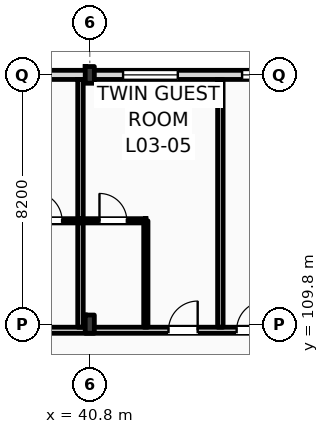
"""IFC4 building model, lengths in metres.
Left out: names, types, materials, properties, quantities, classifications, styles, units other than length and angle.
Written with IfcOpenShell. Run it as: python <this file> out.ifc"""

import sys

from ifc_helpers import new_model, si_unit, direction, frame, frame_2d, origin, origin_2d, place, context, subcontext, project, spatial, rectangle, i_section, extrude, element, fill, save


model = new_model("IFC4")
c1 = context("Model", 3, precision=1e-05, world=origin(), true_north=direction((0.0, 1.0)))
c2 = subcontext(c1, "Body", "Model", "MODEL_VIEW")
j1 = project(units=[si_unit("LENGTHUNIT", "METRE"), si_unit("PLANEANGLEUNIT", "RADIAN")], contexts=[c1])
p1 = place(None, origin())
s1 = spatial("IfcSite", under=j1, at=p1, CompositionType="ELEMENT")
p2 = place(p1, origin())
s2 = spatial("IfcBuilding", under=s1, at=p2, CompositionType="ELEMENT")
p3 = place(p2, frame((0.0, 0.0, 16.2)))
s3 = spatial("IfcBuildingStorey", under=s2, at=p3, CompositionType="ELEMENT", Elevation=16.2)
p4 = place(p3, frame((40.8, 109.8, 0.0), z_axis=(0.0, 0.0, 1.0), x_axis=(1.0, 0.0, 0.0)))
e1 = element("IfcColumn", 1, at=p4, inside=s3, PredefinedType="COLUMN", context=c2, shape_type="SweptSolid", body=[
    extrude(i_section(OverallWidth=0.3, OverallDepth=0.6, WebThickness=0.015, FlangeThickness=0.03, FilletRadius=0.027, at=origin_2d()), origin(), (0.0, 0.0, 1.0), 4.2),
])
p5 = place(p3, frame((40.8, 118.0, 0.0), z_axis=(0.0, 0.0, 1.0), x_axis=(1.0, 0.0, 0.0)))
e2 = element("IfcColumn", 2, at=p5, inside=s3, PredefinedType="COLUMN", context=c2, shape_type="SweptSolid", body=[
    extrude(i_section(OverallWidth=0.3, OverallDepth=0.55, WebThickness=0.015, FlangeThickness=0.029, FilletRadius=0.027, at=origin_2d()), origin(), (0.0, 0.0, 1.0), 4.2),
])
p6 = place(p3, frame((22.5, 118.0, 0.0), z_axis=(0.0, 0.0, 1.0), x_axis=(1.0, 0.0, 0.0)))
e3 = element("IfcWall", 3, at=p6, inside=s3, PredefinedType="STANDARD", context=c2, shape_type="SweptSolid", body=[
    extrude(rectangle(XDim=97.5, YDim=0.3, at=frame_2d((48.75, 0.0))), origin(), (0.0, 0.0, 1.0), 3.36),
])
p7 = place(p6, frame((3.721, 0.0, 0.9)))
e4 = element("IfcOpeningElement", 4, at=p7, cuts=e3, PredefinedType="OPENING", context=c2, shape_type="SweptSolid", body=[
    extrude(rectangle(XDim=0.9, YDim=1.8, at=frame_2d((0.45, 0.9))), frame((0.0, 0.16, 0.0), z_axis=(0.0, -1.0, 0.0), x_axis=(1.0, 0.0, 0.0)), (0.0, 0.0, 1.0), 0.32),
])
p8 = place(p6, frame((6.447, 0.0, 0.9)))
e5 = element("IfcOpeningElement", 5, at=p8, cuts=e3, PredefinedType="OPENING", context=c2, shape_type="SweptSolid", body=[
    extrude(rectangle(XDim=1.35, YDim=1.85, at=frame_2d((0.675, 0.925))), frame((0.0, 0.16, 0.0), z_axis=(0.0, -1.0, 0.0), x_axis=(1.0, 0.0, 0.0)), (0.0, 0.0, 1.0), 0.32),
])
p9 = place(p6, frame((11.363, 0.0, 0.9)))
e6 = element("IfcOpeningElement", 6, at=p9, cuts=e3, PredefinedType="OPENING", context=c2, shape_type="SweptSolid", body=[
    extrude(rectangle(XDim=1.5, YDim=1.9, at=frame_2d((0.75, 0.95))), frame((0.0, 0.16, 0.0), z_axis=(0.0, -1.0, 0.0), x_axis=(1.0, 0.0, 0.0)), (0.0, 0.0, 1.0), 0.32),
])
p10 = place(p6, frame((15.078, 0.0, 0.9)))
e7 = element("IfcOpeningElement", 7, at=p10, cuts=e3, PredefinedType="OPENING", context=c2, shape_type="SweptSolid", body=[
    extrude(rectangle(XDim=1.65, YDim=1.95, at=frame_2d((0.825, 0.975))), frame((0.0, 0.16, 0.0), z_axis=(0.0, -1.0, 0.0), x_axis=(1.0, 0.0, 0.0)), (0.0, 0.0, 1.0), 0.32),
])
p11 = place(p6, frame((19.395, 0.0, 0.9)))
e8 = element("IfcOpeningElement", 8, at=p11, cuts=e3, PredefinedType="OPENING", context=c2, shape_type="SweptSolid", body=[
    extrude(rectangle(XDim=1.8, YDim=2.0, at=frame_2d((0.9, 1.0))), frame((0.0, 0.16, 0.0), z_axis=(0.0, -1.0, 0.0), x_axis=(1.0, 0.0, 0.0)), (0.0, 0.0, 1.0), 0.32),
])
p12 = place(p6, frame((23.31, 0.0, 0.9)))
e9 = element("IfcOpeningElement", 9, at=p12, cuts=e3, PredefinedType="OPENING", context=c2, shape_type="SweptSolid", body=[
    extrude(rectangle(XDim=1.95, YDim=2.05, at=frame_2d((0.975, 1.025))), frame((0.0, 0.16, 0.0), z_axis=(0.0, -1.0, 0.0), x_axis=(1.0, 0.0, 0.0)), (0.0, 0.0, 1.0), 0.32),
])
p13 = place(p6, frame((28.026, 0.0, 0.9)))
e10 = element("IfcOpeningElement", 10, at=p13, cuts=e3, PredefinedType="OPENING", context=c2, shape_type="SweptSolid", body=[
    extrude(rectangle(XDim=2.1, YDim=2.1, at=frame_2d((1.05, 1.05))), frame((0.0, 0.16, 0.0), z_axis=(0.0, -1.0, 0.0), x_axis=(1.0, 0.0, 0.0)), (0.0, 0.0, 1.0), 0.32),
])
p14 = place(p6, frame((31.941, 0.0, 0.9)))
e11 = element("IfcOpeningElement", 11, at=p14, cuts=e3, PredefinedType="OPENING", context=c2, shape_type="SweptSolid", body=[
    extrude(rectangle(XDim=1.1, YDim=2.15, at=frame_2d((0.55, 1.075))), frame((0.0, 0.16, 0.0), z_axis=(0.0, -1.0, 0.0), x_axis=(1.0, 0.0, 0.0)), (0.0, 0.0, 1.0), 0.32),
])
p15 = place(p6, frame((36.657, 0.0, 0.9)))
e12 = element("IfcOpeningElement", 12, at=p15, cuts=e3, PredefinedType="OPENING", context=c2, shape_type="SweptSolid", body=[
    extrude(rectangle(XDim=2.4, YDim=2.2, at=frame_2d((1.2, 1.1))), frame((0.0, 0.16, 0.0), z_axis=(0.0, -1.0, 0.0), x_axis=(1.0, 0.0, 0.0)), (0.0, 0.0, 1.0), 0.32),
])
p16 = place(p6, frame((42.574, 0.0, 0.9)))
e13 = element("IfcOpeningElement", 13, at=p16, cuts=e3, PredefinedType="OPENING", context=c2, shape_type="SweptSolid", body=[
    extrude(rectangle(XDim=1.35, YDim=2.25, at=frame_2d((0.675, 1.125))), frame((0.0, 0.16, 0.0), z_axis=(0.0, -1.0, 0.0), x_axis=(1.0, 0.0, 0.0)), (0.0, 0.0, 1.0), 0.32),
])
p17 = place(p6, frame((45.289, 0.0, 0.9)))
e14 = element("IfcOpeningElement", 14, at=p17, cuts=e3, PredefinedType="OPENING", context=c2, shape_type="SweptSolid", body=[
    extrude(rectangle(XDim=2.7, YDim=2.28, at=frame_2d((1.35, 1.14))), frame((0.0, 0.16, 0.0), z_axis=(0.0, -1.0, 0.0), x_axis=(1.0, 0.0, 0.0)), (0.0, 0.0, 1.0), 0.32),
])
p18 = place(p6, frame((50.406, 0.0, 0.9)))
e15 = element("IfcOpeningElement", 15, at=p18, cuts=e3, PredefinedType="OPENING", context=c2, shape_type="SweptSolid", body=[
    extrude(rectangle(XDim=1.8, YDim=2.28, at=frame_2d((0.9, 1.14))), frame((0.0, 0.16, 0.0), z_axis=(0.0, -1.0, 0.0), x_axis=(1.0, 0.0, 0.0)), (0.0, 0.0, 1.0), 0.32),
])
p19 = place(p6, frame((53.922, 0.0, 0.9)))
e16 = element("IfcOpeningElement", 16, at=p19, cuts=e3, PredefinedType="OPENING", context=c2, shape_type="SweptSolid", body=[
    extrude(rectangle(XDim=1.8, YDim=2.28, at=frame_2d((0.9, 1.14))), frame((0.0, 0.16, 0.0), z_axis=(0.0, -1.0, 0.0), x_axis=(1.0, 0.0, 0.0)), (0.0, 0.0, 1.0), 0.32),
])
p20 = place(p6, frame((58.332, 0.0, 0.9)))
e17 = element("IfcOpeningElement", 17, at=p20, cuts=e3, PredefinedType="OPENING", context=c2, shape_type="SweptSolid", body=[
    extrude(rectangle(XDim=2.961, YDim=2.28, at=frame_2d((1.48, 1.14))), frame((0.0, 0.16, 0.0), z_axis=(0.0, -1.0, 0.0), x_axis=(1.0, 0.0, 0.0)), (0.0, 0.0, 1.0), 0.32),
])
p21 = place(p6, frame((62.513, 0.0, 0.9)))
e18 = element("IfcOpeningElement", 18, at=p21, cuts=e3, PredefinedType="OPENING", context=c2, shape_type="SweptSolid", body=[
    extrude(rectangle(XDim=1.8, YDim=2.28, at=frame_2d((0.9, 1.14))), frame((0.0, 0.16, 0.0), z_axis=(0.0, -1.0, 0.0), x_axis=(1.0, 0.0, 0.0)), (0.0, 0.0, 1.0), 0.32),
])
p22 = place(p6, frame((67.114, 0.0, 0.9)))
e19 = element("IfcOpeningElement", 19, at=p22, cuts=e3, PredefinedType="OPENING", context=c2, shape_type="SweptSolid", body=[
    extrude(rectangle(XDim=2.961, YDim=2.28, at=frame_2d((1.48, 1.14))), frame((0.0, 0.16, 0.0), z_axis=(0.0, -1.0, 0.0), x_axis=(1.0, 0.0, 0.0)), (0.0, 0.0, 1.0), 0.32),
])
p23 = place(p6, frame((73.695, 0.0, 0.9)))
e20 = element("IfcOpeningElement", 20, at=p23, cuts=e3, PredefinedType="OPENING", context=c2, shape_type="SweptSolid", body=[
    extrude(rectangle(XDim=1.1, YDim=2.28, at=frame_2d((0.55, 1.14))), frame((0.0, 0.16, 0.0), z_axis=(0.0, -1.0, 0.0), x_axis=(1.0, 0.0, 0.0)), (0.0, 0.0, 1.0), 0.32),
])
p24 = place(p6, frame((75.895, 0.0, 0.9)))
e21 = element("IfcOpeningElement", 21, at=p24, cuts=e3, PredefinedType="OPENING", context=c2, shape_type="SweptSolid", body=[
    extrude(rectangle(XDim=2.961, YDim=2.28, at=frame_2d((1.48, 1.14))), frame((0.0, 0.16, 0.0), z_axis=(0.0, -1.0, 0.0), x_axis=(1.0, 0.0, 0.0)), (0.0, 0.0, 1.0), 0.32),
])
p25 = place(p6, frame((81.676, 0.0, 0.9)))
e22 = element("IfcOpeningElement", 22, at=p25, cuts=e3, PredefinedType="OPENING", context=c2, shape_type="SweptSolid", body=[
    extrude(rectangle(XDim=1.8, YDim=2.28, at=frame_2d((0.9, 1.14))), frame((0.0, 0.16, 0.0), z_axis=(0.0, -1.0, 0.0), x_axis=(1.0, 0.0, 0.0)), (0.0, 0.0, 1.0), 0.32),
])
p26 = place(p6, frame((84.677, 0.0, 0.9)))
e23 = element("IfcOpeningElement", 23, at=p26, cuts=e3, PredefinedType="OPENING", context=c2, shape_type="SweptSolid", body=[
    extrude(rectangle(XDim=2.961, YDim=2.28, at=frame_2d((1.48, 1.14))), frame((0.0, 0.16, 0.0), z_axis=(0.0, -1.0, 0.0), x_axis=(1.0, 0.0, 0.0)), (0.0, 0.0, 1.0), 0.32),
])
p27 = place(p6, frame((89.999, 0.0, 0.9)))
e24 = element("IfcOpeningElement", 24, at=p27, cuts=e3, PredefinedType="OPENING", context=c2, shape_type="SweptSolid", body=[
    extrude(rectangle(XDim=1.1, YDim=1.5, at=frame_2d((0.55, 0.75))), frame((0.0, 0.16, 0.0), z_axis=(0.0, -1.0, 0.0), x_axis=(1.0, 0.0, 0.0)), (0.0, 0.0, 1.0), 0.32),
])
p28 = place(p6, frame((94.35, 0.0, 0.9)))
e25 = element("IfcOpeningElement", 25, at=p28, cuts=e3, PredefinedType="OPENING", context=c2, shape_type="SweptSolid", body=[
    extrude(rectangle(XDim=1.25, YDim=1.6, at=frame_2d((0.625, 0.8))), frame((0.0, 0.16, 0.0), z_axis=(0.0, -1.0, 0.0), x_axis=(1.0, 0.0, 0.0)), (0.0, 0.0, 1.0), 0.32),
])
p29 = place(p3, frame((10.65, 109.6, 0.0), z_axis=(0.0, 0.0, 1.0), x_axis=(1.0, 0.0, 0.0)))
e26 = element("IfcWall", 26, at=p29, inside=s3, PredefinedType="PARTITIONING", context=c2, shape_type="SweptSolid", body=[
    extrude(rectangle(XDim=109.21, YDim=0.2, at=frame_2d((54.605, 0.0))), origin(), (0.0, 0.0, 1.0), 3.36),
])
p30 = place(p29, frame((15.43, 0.0, 0.0)))
e27 = element("IfcOpeningElement", 27, at=p30, cuts=e26, PredefinedType="OPENING", context=c2, shape_type="SweptSolid", body=[
    extrude(rectangle(XDim=1.02, YDim=2.2, at=frame_2d((0.51, 1.1))), frame((0.0, 0.11, 0.0), z_axis=(0.0, -1.0, 0.0), x_axis=(1.0, 0.0, 0.0)), (0.0, 0.0, 1.0), 0.22),
])
p31 = place(p29, frame((19.537, 0.0, 0.0)))
e28 = element("IfcOpeningElement", 28, at=p31, cuts=e26, PredefinedType="OPENING", context=c2, shape_type="SweptSolid", body=[
    extrude(rectangle(XDim=1.02, YDim=2.2, at=frame_2d((0.51, 1.1))), frame((0.0, 0.11, 0.0), z_axis=(0.0, -1.0, 0.0), x_axis=(1.0, 0.0, 0.0)), (0.0, 0.0, 1.0), 0.22),
])
p32 = place(p29, frame((23.928, 0.0, 0.0)))
e29 = element("IfcOpeningElement", 29, at=p32, cuts=e26, PredefinedType="OPENING", context=c2, shape_type="SweptSolid", body=[
    extrude(rectangle(XDim=1.02, YDim=2.2, at=frame_2d((0.51, 1.1))), frame((0.0, 0.11, 0.0), z_axis=(0.0, -1.0, 0.0), x_axis=(1.0, 0.0, 0.0)), (0.0, 0.0, 1.0), 0.22),
])
p33 = place(p29, frame((26.169, 0.0, 0.0)))
e30 = element("IfcOpeningElement", 30, at=p33, cuts=e26, PredefinedType="OPENING", context=c2, shape_type="SweptSolid", body=[
    extrude(rectangle(XDim=1.02, YDim=2.2, at=frame_2d((0.51, 1.1))), frame((0.0, 0.11, 0.0), z_axis=(0.0, -1.0, 0.0), x_axis=(1.0, 0.0, 0.0)), (0.0, 0.0, 1.0), 0.22),
])
p34 = place(p29, frame((32.739, 0.0, 0.0)))
e31 = element("IfcOpeningElement", 31, at=p34, cuts=e26, PredefinedType="OPENING", context=c2, shape_type="SweptSolid", body=[
    extrude(rectangle(XDim=0.96, YDim=2.2, at=frame_2d((0.48, 1.1))), frame((0.0, 0.11, 0.0), z_axis=(0.0, -1.0, 0.0), x_axis=(1.0, 0.0, 0.0)), (0.0, 0.0, 1.0), 0.22),
])
p35 = place(p29, frame((34.98, 0.0, 0.0)))
e32 = element("IfcOpeningElement", 32, at=p35, cuts=e26, PredefinedType="OPENING", context=c2, shape_type="SweptSolid", body=[
    extrude(rectangle(XDim=0.96, YDim=2.2, at=frame_2d((0.48, 1.1))), frame((0.0, 0.11, 0.0), z_axis=(0.0, -1.0, 0.0), x_axis=(1.0, 0.0, 0.0)), (0.0, 0.0, 1.0), 0.22),
])
p36 = place(p29, frame((41.521, 0.0, 0.0)))
e33 = element("IfcOpeningElement", 33, at=p36, cuts=e26, PredefinedType="OPENING", context=c2, shape_type="SweptSolid", body=[
    extrude(rectangle(XDim=0.96, YDim=2.2, at=frame_2d((0.48, 1.1))), frame((0.0, 0.11, 0.0), z_axis=(0.0, -1.0, 0.0), x_axis=(1.0, 0.0, 0.0)), (0.0, 0.0, 1.0), 0.22),
])
p37 = place(p29, frame((43.512, 0.0, 0.0)))
e34 = element("IfcOpeningElement", 34, at=p37, cuts=e26, PredefinedType="OPENING", context=c2, shape_type="SweptSolid", body=[
    extrude(rectangle(XDim=0.96, YDim=2.2, at=frame_2d((0.48, 1.1))), frame((0.0, 0.11, 0.0), z_axis=(0.0, -1.0, 0.0), x_axis=(1.0, 0.0, 0.0)), (0.0, 0.0, 1.0), 0.22),
])
p38 = place(p29, frame((50.303, 0.0, 0.0)))
e35 = element("IfcOpeningElement", 35, at=p38, cuts=e26, PredefinedType="OPENING", context=c2, shape_type="SweptSolid", body=[
    extrude(rectangle(XDim=0.96, YDim=2.2, at=frame_2d((0.48, 1.1))), frame((0.0, 0.11, 0.0), z_axis=(0.0, -1.0, 0.0), x_axis=(1.0, 0.0, 0.0)), (0.0, 0.0, 1.0), 0.22),
])
p39 = place(p29, frame((54.944, 0.0, 0.0)))
e36 = element("IfcOpeningElement", 36, at=p39, cuts=e26, PredefinedType="OPENING", context=c2, shape_type="SweptSolid", body=[
    extrude(rectangle(XDim=0.96, YDim=2.2, at=frame_2d((0.48, 1.1))), frame((0.0, 0.11, 0.0), z_axis=(0.0, -1.0, 0.0), x_axis=(1.0, 0.0, 0.0)), (0.0, 0.0, 1.0), 0.22),
])
p40 = place(p29, frame((59.085, 0.0, 0.0)))
e37 = element("IfcOpeningElement", 37, at=p40, cuts=e26, PredefinedType="OPENING", context=c2, shape_type="SweptSolid", body=[
    extrude(rectangle(XDim=0.96, YDim=2.2, at=frame_2d((0.48, 1.1))), frame((0.0, 0.11, 0.0), z_axis=(0.0, -1.0, 0.0), x_axis=(1.0, 0.0, 0.0)), (0.0, 0.0, 1.0), 0.22),
])
p41 = place(p29, frame((63.476, 0.0, 0.0)))
e38 = element("IfcOpeningElement", 38, at=p41, cuts=e26, PredefinedType="OPENING", context=c2, shape_type="SweptSolid", body=[
    extrude(rectangle(XDim=0.96, YDim=2.2, at=frame_2d((0.48, 1.1))), frame((0.0, 0.11, 0.0), z_axis=(0.0, -1.0, 0.0), x_axis=(1.0, 0.0, 0.0)), (0.0, 0.0, 1.0), 0.22),
])
p42 = place(p29, frame((65.716, 0.0, 0.0)))
e39 = element("IfcOpeningElement", 39, at=p42, cuts=e26, PredefinedType="OPENING", context=c2, shape_type="SweptSolid", body=[
    extrude(rectangle(XDim=0.96, YDim=2.2, at=frame_2d((0.48, 1.1))), frame((0.0, 0.11, 0.0), z_axis=(0.0, -1.0, 0.0), x_axis=(1.0, 0.0, 0.0)), (0.0, 0.0, 1.0), 0.22),
])
p43 = place(p29, frame((72.257, 0.0, 0.0)))
e40 = element("IfcOpeningElement", 40, at=p43, cuts=e26, PredefinedType="OPENING", context=c2, shape_type="SweptSolid", body=[
    extrude(rectangle(XDim=0.96, YDim=2.2, at=frame_2d((0.48, 1.1))), frame((0.0, 0.11, 0.0), z_axis=(0.0, -1.0, 0.0), x_axis=(1.0, 0.0, 0.0)), (0.0, 0.0, 1.0), 0.22),
])
p44 = place(p29, frame((74.498, 0.0, 0.0)))
e41 = element("IfcOpeningElement", 41, at=p44, cuts=e26, PredefinedType="OPENING", context=c2, shape_type="SweptSolid", body=[
    extrude(rectangle(XDim=0.96, YDim=2.2, at=frame_2d((0.48, 1.1))), frame((0.0, 0.11, 0.0), z_axis=(0.0, -1.0, 0.0), x_axis=(1.0, 0.0, 0.0)), (0.0, 0.0, 1.0), 0.22),
])
p45 = place(p29, frame((81.039, 0.0, 0.0)))
e42 = element("IfcOpeningElement", 42, at=p45, cuts=e26, PredefinedType="OPENING", context=c2, shape_type="SweptSolid", body=[
    extrude(rectangle(XDim=0.96, YDim=2.2, at=frame_2d((0.48, 1.1))), frame((0.0, 0.11, 0.0), z_axis=(0.0, -1.0, 0.0), x_axis=(1.0, 0.0, 0.0)), (0.0, 0.0, 1.0), 0.22),
])
p46 = place(p29, frame((85.68, 0.0, 0.0)))
e43 = element("IfcOpeningElement", 43, at=p46, cuts=e26, PredefinedType="OPENING", context=c2, shape_type="SweptSolid", body=[
    extrude(rectangle(XDim=0.96, YDim=2.2, at=frame_2d((0.48, 1.1))), frame((0.0, 0.11, 0.0), z_axis=(0.0, -1.0, 0.0), x_axis=(1.0, 0.0, 0.0)), (0.0, 0.0, 1.0), 0.22),
])
p47 = place(p29, frame((89.82, 0.0, 0.0)))
e44 = element("IfcOpeningElement", 44, at=p47, cuts=e26, PredefinedType="OPENING", context=c2, shape_type="SweptSolid", body=[
    extrude(rectangle(XDim=0.96, YDim=2.2, at=frame_2d((0.48, 1.1))), frame((0.0, 0.11, 0.0), z_axis=(0.0, -1.0, 0.0), x_axis=(1.0, 0.0, 0.0)), (0.0, 0.0, 1.0), 0.22),
])
p48 = place(p29, frame((94.211, 0.0, 0.0)))
e45 = element("IfcOpeningElement", 45, at=p48, cuts=e26, PredefinedType="OPENING", context=c2, shape_type="SweptSolid", body=[
    extrude(rectangle(XDim=0.96, YDim=2.2, at=frame_2d((0.48, 1.1))), frame((0.0, 0.11, 0.0), z_axis=(0.0, -1.0, 0.0), x_axis=(1.0, 0.0, 0.0)), (0.0, 0.0, 1.0), 0.22),
])
p49 = place(p29, frame((98.602, 0.0, 0.0)))
e46 = element("IfcOpeningElement", 46, at=p49, cuts=e26, PredefinedType="OPENING", context=c2, shape_type="SweptSolid", body=[
    extrude(rectangle(XDim=0.96, YDim=2.2, at=frame_2d((0.48, 1.1))), frame((0.0, 0.11, 0.0), z_axis=(0.0, -1.0, 0.0), x_axis=(1.0, 0.0, 0.0)), (0.0, 0.0, 1.0), 0.22),
])
p50 = place(p29, frame((102.993, 0.0, 0.0)))
e47 = element("IfcOpeningElement", 47, at=p50, cuts=e26, PredefinedType="OPENING", context=c2, shape_type="SweptSolid", body=[
    extrude(rectangle(XDim=0.96, YDim=2.2, at=frame_2d((0.48, 1.1))), frame((0.0, 0.11, 0.0), z_axis=(0.0, -1.0, 0.0), x_axis=(1.0, 0.0, 0.0)), (0.0, 0.0, 1.0), 0.22),
])
p51 = place(p29, frame((105.269, 0.0, 0.0)))
e48 = element("IfcOpeningElement", 48, at=p51, cuts=e26, PredefinedType="OPENING", context=c2, shape_type="SweptSolid", body=[
    extrude(rectangle(XDim=0.96, YDim=2.2, at=frame_2d((0.48, 1.1))), frame((0.0, 0.11, 0.0), z_axis=(0.0, -1.0, 0.0), x_axis=(1.0, 0.0, 0.0)), (0.0, 0.0, 1.0), 0.22),
])
p52 = place(p29, frame((2.716, 0.0, 0.0)))
e49 = element("IfcOpeningElement", 49, at=p52, cuts=e26, PredefinedType="OPENING", context=c2, shape_type="SweptSolid", body=[
    extrude(rectangle(XDim=1.35, YDim=2.25, at=frame_2d((0.675, 1.125))), frame((0.0, 0.11, 0.0), z_axis=(0.0, -1.0, 0.0), x_axis=(1.0, 0.0, 0.0)), (0.0, 0.0, 1.0), 0.22),
])
p53 = place(p29, frame((6.65, 0.0, 0.0)))
e50 = element("IfcOpeningElement", 50, at=p53, cuts=e26, PredefinedType="OPENING", context=c2, shape_type="SweptSolid", body=[
    extrude(rectangle(XDim=1.35, YDim=2.25, at=frame_2d((0.675, 1.125))), frame((0.0, 0.11, 0.0), z_axis=(0.0, -1.0, 0.0), x_axis=(1.0, 0.0, 0.0)), (0.0, 0.0, 1.0), 0.22),
])
p54 = place(p29, frame((10.583, 0.0, 0.0)))
e51 = element("IfcOpeningElement", 51, at=p54, cuts=e26, PredefinedType="OPENING", context=c2, shape_type="SweptSolid", body=[
    extrude(rectangle(XDim=1.35, YDim=2.25, at=frame_2d((0.675, 1.125))), frame((0.0, 0.11, 0.0), z_axis=(0.0, -1.0, 0.0), x_axis=(1.0, 0.0, 0.0)), (0.0, 0.0, 1.0), 0.22),
])
p55 = place(p3, frame((40.494, 109.7, 0.0), z_axis=(0.0, 0.0, 1.0), x_axis=(0.0, 1.0, 0.0)))
e52 = element("IfcWall", 52, at=p55, inside=s3, PredefinedType="PARTITIONING", context=c2, shape_type="SweptSolid", body=[
    extrude(rectangle(XDim=8.15, YDim=0.18, at=frame_2d((4.075, 0.0))), origin(), (0.0, 0.0, 1.0), 3.92),
])
p56 = place(p3, frame((38.344, 113.2, 0.0), z_axis=(0.0, 0.0, 1.0), x_axis=(1.0, 0.0, 0.0)))
e53 = element("IfcWall", 53, at=p56, inside=s3, PredefinedType="PARTITIONING", context=c2, shape_type="SweptSolid", body=[
    extrude(rectangle(XDim=2.15, YDim=0.14, at=frame_2d((1.075, 0.0))), origin(), (0.0, 0.0, 1.0), 3.92),
])
p57 = place(p56, frame((0.605, 0.0, 0.0)))
e54 = element("IfcOpeningElement", 54, at=p57, cuts=e53, PredefinedType="OPENING", context=c2, shape_type="SweptSolid", body=[
    extrude(rectangle(XDim=0.94, YDim=2.15, at=frame_2d((0.47, 1.075))), frame((0.0, 0.08, 0.0), z_axis=(0.0, -1.0, 0.0), x_axis=(1.0, 0.0, 0.0)), (0.0, 0.0, 1.0), 0.16),
])
p58 = place(p3, frame((45.095, 109.7, 0.0), z_axis=(0.0, 0.0, 1.0), x_axis=(0.0, 1.0, 0.0)))
e55 = element("IfcWall", 55, at=p58, inside=s3, PredefinedType="PARTITIONING", context=c2, shape_type="SweptSolid", body=[
    extrude(rectangle(XDim=8.15, YDim=0.18, at=frame_2d((4.075, 0.0))), origin(), (0.0, 0.0, 1.0), 3.92),
])
p59 = place(p3, frame((42.644, 109.7, 0.0), z_axis=(0.0, 0.0, 1.0), x_axis=(0.0, 1.0, 0.0)))
e56 = element("IfcWall", 56, at=p59, inside=s3, PredefinedType="PARTITIONING", context=c2, shape_type="SweptSolid", body=[
    extrude(rectangle(XDim=3.5, YDim=0.14, at=frame_2d((1.75, 0.0))), origin(), (0.0, 0.0, 1.0), 3.92),
])
p60 = place(p3, frame((40.494, 113.2, 0.0), z_axis=(0.0, 0.0, 1.0), x_axis=(1.0, 0.0, 0.0)))
e57 = element("IfcWall", 57, at=p60, inside=s3, PredefinedType="PARTITIONING", context=c2, shape_type="SweptSolid", body=[
    extrude(rectangle(XDim=2.15, YDim=0.14, at=frame_2d((1.075, 0.0))), origin(), (0.0, 0.0, 1.0), 3.92),
])
p61 = place(p60, frame((0.625, 0.0, 0.0)))
e58 = element("IfcOpeningElement", 58, at=p61, cuts=e57, PredefinedType="OPENING", context=c2, shape_type="SweptSolid", body=[
    extrude(rectangle(XDim=0.9, YDim=2.1, at=frame_2d((0.45, 1.05))), frame((0.0, 0.08, 0.0), z_axis=(0.0, -1.0, 0.0), x_axis=(1.0, 0.0, 0.0)), (0.0, 0.0, 1.0), 0.16),
])
p62 = place(p11, origin())
e59 = element("IfcWindow", 59, at=p62, inside=s3, PartitioningType="DOUBLE_PANEL_VERTICAL", PredefinedType="WINDOW", context=c2, shape_type="SweptSolid", body=[
    extrude(rectangle(XDim=1.8, YDim=2.0, at=frame_2d((0.9, 1.0))), frame((0.0, 0.03, 0.0), z_axis=(0.0, -1.0, 0.0), x_axis=(1.0, 0.0, 0.0)), (0.0, 0.0, 1.0), 0.06),
])
fill(e8, e59)
p63 = place(p12, origin())
e60 = element("IfcWindow", 60, at=p63, inside=s3, PartitioningType="DOUBLE_PANEL_VERTICAL", PredefinedType="WINDOW", context=c2, shape_type="SweptSolid", body=[
    extrude(rectangle(XDim=1.95, YDim=2.05, at=frame_2d((0.975, 1.025))), frame((0.0, 0.03, 0.0), z_axis=(0.0, -1.0, 0.0), x_axis=(1.0, 0.0, 0.0)), (0.0, 0.0, 1.0), 0.06),
])
fill(e9, e60)
p64 = place(p57, origin())
e61 = element("IfcDoor", 61, at=p64, inside=s3, OperationType="SINGLE_SWING_LEFT", PredefinedType="DOOR", context=c2, shape_type="SweptSolid", body=[
    extrude(rectangle(XDim=0.94, YDim=2.15, at=frame_2d((0.47, 1.075))), frame((0.0, 0.025, 0.0), z_axis=(0.0, -1.0, 0.0), x_axis=(1.0, 0.0, 0.0)), (0.0, 0.0, 1.0), 0.05),
])
fill(e54, e61)
p65 = place(p34, origin())
e62 = element("IfcDoor", 62, at=p65, inside=s3, OperationType="SINGLE_SWING_RIGHT", PredefinedType="DOOR", context=c2, shape_type="SweptSolid", body=[
    extrude(rectangle(XDim=0.96, YDim=2.2, at=frame_2d((0.48, 1.1))), frame((0.0, 0.025, 0.0), z_axis=(0.0, -1.0, 0.0), x_axis=(1.0, 0.0, 0.0)), (0.0, 0.0, 1.0), 0.05),
])
fill(e31, e62)
p66 = place(p61, origin())
e63 = element("IfcDoor", 63, at=p66, inside=s3, OperationType="SINGLE_SWING_LEFT", PredefinedType="DOOR", context=c2, shape_type="SweptSolid", body=[
    extrude(rectangle(XDim=0.9, YDim=2.1, at=frame_2d((0.45, 1.05))), frame((0.0, 0.025, 0.0), z_axis=(0.0, -1.0, 0.0), x_axis=(1.0, 0.0, 0.0)), (0.0, 0.0, 1.0), 0.05),
])
fill(e58, e63)
p67 = place(p35, origin())
e64 = element("IfcDoor", 64, at=p67, inside=s3, OperationType="SINGLE_SWING_RIGHT", PredefinedType="DOOR", context=c2, shape_type="SweptSolid", body=[
    extrude(rectangle(XDim=0.96, YDim=2.2, at=frame_2d((0.48, 1.1))), frame((0.0, 0.025, 0.0), z_axis=(0.0, -1.0, 0.0), x_axis=(1.0, 0.0, 0.0)), (0.0, 0.0, 1.0), 0.05),
])
fill(e32, e64)
save(model, sys.argv[1])
